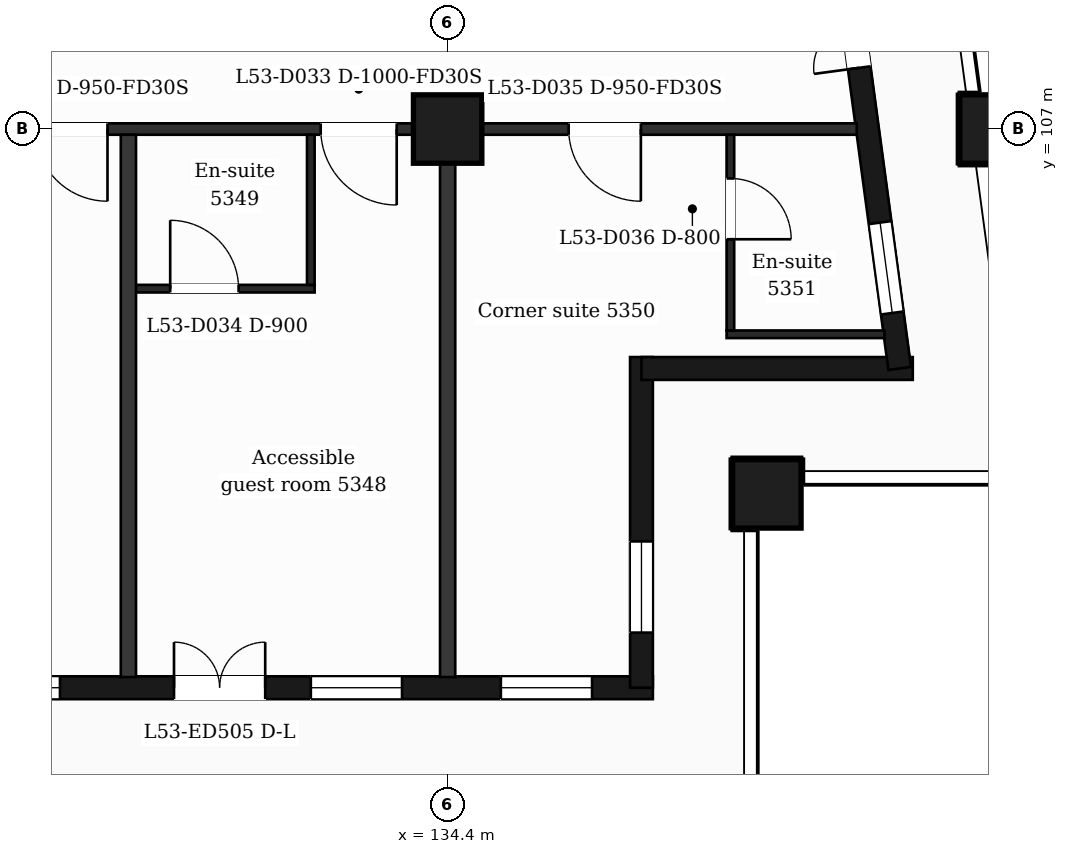
"""IFC4 building model, lengths in metres.
Left out: names, types, materials, properties, quantities, classifications, styles, units other than length and angle.
Written with IfcOpenShell. Run it as: python <this file> out.ifc"""

import sys

from ifc_helpers import new_model, si_unit, direction, frame, frame_2d, origin, origin_2d, place, context, subcontext, project, spatial, rectangle, extrude, element, fill, save


model = new_model("IFC4")
c1 = context("Model", 3, precision=1e-05, world=origin(), true_north=direction((0.0, 1.0)))
c2 = subcontext(c1, "Body", "Model", "MODEL_VIEW")
j1 = project(units=[si_unit("LENGTHUNIT", "METRE"), si_unit("PLANEANGLEUNIT", "RADIAN")], contexts=[c1])
p1 = place(None, origin())
s1 = spatial("IfcSite", under=j1, at=p1, CompositionType="ELEMENT")
p2 = place(p1, origin())
s2 = spatial("IfcBuilding", under=s1, at=p2, CompositionType="ELEMENT")
p3 = place(p2, frame((0.0, 0.0, 220.7)))
s3 = spatial("IfcBuildingStorey", under=s2, at=p3, CompositionType="ELEMENT", Elevation=220.7)
for number, where, z_axis, x_axis in (
    (1, (138.6, 102.2, 0.0), (0.0, 0.0, 1.0), (1.0, 0.0, 0.0)),
    (2, (134.4, 107.0, 0.0), (0.0, 0.0, 1.0), (1.0, 0.0, 0.0)),
    (3, (141.588, 107.0, 0.0), (0.0, 0.0, 1.0), (1.0, 0.0, 0.0)),
):
    element("IfcColumn", number, at=place(p3, frame(where, z_axis=z_axis, x_axis=x_axis)), inside=s3, PredefinedType="COLUMN", context=c2, shape_type="SweptSolid", body=[
        extrude(rectangle(XDim=0.9, YDim=0.9, at=origin_2d()), origin(), (0.0, 0.0, 1.0), 3.7),
    ])
p4 = place(p3, frame((89.85, 99.65, 0.0), z_axis=(0.0, 0.0, 1.0), x_axis=(1.0, 0.0, 0.0)))
e4 = element("IfcWall", 4, at=p4, inside=s3, PredefinedType="SOLIDWALL", context=c2, shape_type="SweptSolid", body=[
    extrude(rectangle(XDim=47.25, YDim=0.3, at=frame_2d((23.625, 0.0))), origin(), (0.0, 0.0, 1.0), 3.38),
])
p5 = place(p4, frame((0.725, 0.0, 0.9)))
e5 = element("IfcOpeningElement", 5, at=p5, cuts=e4, PredefinedType="OPENING", context=c2, shape_type="SweptSolid", body=[
    extrude(rectangle(XDim=1.2, YDim=2.1, at=frame_2d((0.6, 1.05))), frame((0.0, 0.16, 0.0), z_axis=(0.0, -1.0, 0.0), x_axis=(1.0, 0.0, 0.0)), (0.0, 0.0, 1.0), 0.32),
])
p6 = place(p4, frame((3.45, 0.0, 0.9)))
e6 = element("IfcOpeningElement", 6, at=p6, cuts=e4, PredefinedType="OPENING", context=c2, shape_type="SweptSolid", body=[
    extrude(rectangle(XDim=2.4, YDim=2.1, at=frame_2d((1.2, 1.05))), frame((0.0, 0.16, 0.0), z_axis=(0.0, -1.0, 0.0), x_axis=(1.0, 0.0, 0.0)), (0.0, 0.0, 1.0), 0.32),
])
p7 = place(p4, frame((7.65, 0.0, 0.9)))
e7 = element("IfcOpeningElement", 7, at=p7, cuts=e4, PredefinedType="OPENING", context=c2, shape_type="SweptSolid", body=[
    extrude(rectangle(XDim=2.4, YDim=2.1, at=frame_2d((1.2, 1.05))), frame((0.0, 0.16, 0.0), z_axis=(0.0, -1.0, 0.0), x_axis=(1.0, 0.0, 0.0)), (0.0, 0.0, 1.0), 0.32),
])
p8 = place(p4, frame((11.85, 0.0, 0.9)))
e8 = element("IfcOpeningElement", 8, at=p8, cuts=e4, PredefinedType="OPENING", context=c2, shape_type="SweptSolid", body=[
    extrude(rectangle(XDim=2.4, YDim=2.1, at=frame_2d((1.2, 1.05))), frame((0.0, 0.16, 0.0), z_axis=(0.0, -1.0, 0.0), x_axis=(1.0, 0.0, 0.0)), (0.0, 0.0, 1.0), 0.32),
])
p9 = place(p4, frame((16.05, 0.0, 0.9)))
e9 = element("IfcOpeningElement", 9, at=p9, cuts=e4, PredefinedType="OPENING", context=c2, shape_type="SweptSolid", body=[
    extrude(rectangle(XDim=2.4, YDim=2.1, at=frame_2d((1.2, 1.05))), frame((0.0, 0.16, 0.0), z_axis=(0.0, -1.0, 0.0), x_axis=(1.0, 0.0, 0.0)), (0.0, 0.0, 1.0), 0.32),
])
p10 = place(p4, frame((20.25, 0.0, 0.9)))
e10 = element("IfcOpeningElement", 10, at=p10, cuts=e4, PredefinedType="OPENING", context=c2, shape_type="SweptSolid", body=[
    extrude(rectangle(XDim=2.4, YDim=2.1, at=frame_2d((1.2, 1.05))), frame((0.0, 0.16, 0.0), z_axis=(0.0, -1.0, 0.0), x_axis=(1.0, 0.0, 0.0)), (0.0, 0.0, 1.0), 0.32),
])
p11 = place(p4, frame((25.05, 0.0, 0.9)))
e11 = element("IfcOpeningElement", 11, at=p11, cuts=e4, PredefinedType="OPENING", context=c2, shape_type="SweptSolid", body=[
    extrude(rectangle(XDim=1.2, YDim=2.1, at=frame_2d((0.6, 1.05))), frame((0.0, 0.16, 0.0), z_axis=(0.0, -1.0, 0.0), x_axis=(1.0, 0.0, 0.0)), (0.0, 0.0, 1.0), 0.32),
])
p12 = place(p4, frame((29.25, 0.0, 0.9)))
e12 = element("IfcOpeningElement", 12, at=p12, cuts=e4, PredefinedType="OPENING", context=c2, shape_type="SweptSolid", body=[
    extrude(rectangle(XDim=1.2, YDim=2.1, at=frame_2d((0.6, 1.05))), frame((0.0, 0.16, 0.0), z_axis=(0.0, -1.0, 0.0), x_axis=(1.0, 0.0, 0.0)), (0.0, 0.0, 1.0), 0.32),
])
p13 = place(p4, frame((32.55, 0.0, 0.0)))
e13 = element("IfcOpeningElement", 13, at=p13, cuts=e4, PredefinedType="OPENING", context=c2, shape_type="SweptSolid", body=[
    extrude(rectangle(XDim=1.2, YDim=2.4, at=frame_2d((0.6, 1.2))), frame((0.0, 0.16, 0.0), z_axis=(0.0, -1.0, 0.0), x_axis=(1.0, 0.0, 0.0)), (0.0, 0.0, 1.0), 0.32),
])
p14 = place(p4, frame((34.35, 0.0, 0.9)))
e14 = element("IfcOpeningElement", 14, at=p14, cuts=e4, PredefinedType="OPENING", context=c2, shape_type="SweptSolid", body=[
    extrude(rectangle(XDim=1.2, YDim=2.1, at=frame_2d((0.6, 1.05))), frame((0.0, 0.16, 0.0), z_axis=(0.0, -1.0, 0.0), x_axis=(1.0, 0.0, 0.0)), (0.0, 0.0, 1.0), 0.32),
])
p15 = place(p4, frame((37.05, 0.0, 0.9)))
e15 = element("IfcOpeningElement", 15, at=p15, cuts=e4, PredefinedType="OPENING", context=c2, shape_type="SweptSolid", body=[
    extrude(rectangle(XDim=2.4, YDim=2.1, at=frame_2d((1.2, 1.05))), frame((0.0, 0.16, 0.0), z_axis=(0.0, -1.0, 0.0), x_axis=(1.0, 0.0, 0.0)), (0.0, 0.0, 1.0), 0.32),
])
p16 = place(p4, frame((40.95, 0.0, 0.0)))
e16 = element("IfcOpeningElement", 16, at=p16, cuts=e4, PredefinedType="OPENING", context=c2, shape_type="SweptSolid", body=[
    extrude(rectangle(XDim=1.2, YDim=2.4, at=frame_2d((0.6, 1.2))), frame((0.0, 0.16, 0.0), z_axis=(0.0, -1.0, 0.0), x_axis=(1.0, 0.0, 0.0)), (0.0, 0.0, 1.0), 0.32),
])
p17 = place(p4, frame((42.75, 0.0, 0.9)))
e17 = element("IfcOpeningElement", 17, at=p17, cuts=e4, PredefinedType="OPENING", context=c2, shape_type="SweptSolid", body=[
    extrude(rectangle(XDim=1.2, YDim=2.1, at=frame_2d((0.6, 1.05))), frame((0.0, 0.16, 0.0), z_axis=(0.0, -1.0, 0.0), x_axis=(1.0, 0.0, 0.0)), (0.0, 0.0, 1.0), 0.32),
])
p18 = place(p4, frame((45.25, 0.0, 0.9)))
e18 = element("IfcOpeningElement", 18, at=p18, cuts=e4, PredefinedType="OPENING", context=c2, shape_type="SweptSolid", body=[
    extrude(rectangle(XDim=1.2, YDim=2.1, at=frame_2d((0.6, 1.05))), frame((0.0, 0.16, 0.0), z_axis=(0.0, -1.0, 0.0), x_axis=(1.0, 0.0, 0.0)), (0.0, 0.0, 1.0), 0.32),
])
p19 = place(p3, frame((136.95, 99.65, 0.0), z_axis=(0.0, 0.0, 1.0), x_axis=(0.0, 1.0, 0.0)))
e19 = element("IfcWall", 19, at=p19, inside=s3, PredefinedType="SOLIDWALL", context=c2, shape_type="SweptSolid", body=[
    extrude(rectangle(XDim=4.35, YDim=0.3, at=frame_2d((2.175, 0.0))), origin(), (0.0, 0.0, 1.0), 3.38),
])
p20 = place(p19, frame((0.725, 0.0, 0.9)))
e20 = element("IfcOpeningElement", 20, at=p20, cuts=e19, PredefinedType="OPENING", context=c2, shape_type="SweptSolid", body=[
    extrude(rectangle(XDim=1.2, YDim=2.1, at=frame_2d((0.6, 1.05))), frame((0.0, 0.16, 0.0), z_axis=(0.0, -1.0, 0.0), x_axis=(1.0, 0.0, 0.0)), (0.0, 0.0, 1.0), 0.32),
])
p21 = place(p3, frame((136.95, 103.85, 0.0), z_axis=(0.0, 0.0, 1.0), x_axis=(1.0, 0.0, 0.0)))
e21 = element("IfcWall", 21, at=p21, inside=s3, PredefinedType="SOLIDWALL", context=c2, shape_type="SweptSolid", body=[
    extrude(rectangle(XDim=3.569, YDim=0.3, at=frame_2d((1.785, 0.0))), origin(), (0.0, 0.0, 1.0), 3.38),
])
p22 = place(p3, frame((140.348, 103.85, 0.0), z_axis=(0.0, 0.0, 1.0), x_axis=(-0.133431549479, 0.991058031401, 0.0)))
e22 = element("IfcWall", 22, at=p22, inside=s3, PredefinedType="SOLIDWALL", context=c2, shape_type="SweptSolid", body=[
    extrude(rectangle(XDim=6.609, YDim=0.3, at=frame_2d((3.304, 0.0))), origin(), (0.0, 0.0, 1.0), 3.38),
])
p23 = place(p22, frame((0.737, 0.0, 0.9)))
e23 = element("IfcOpeningElement", 23, at=p23, cuts=e22, PredefinedType="OPENING", context=c2, shape_type="SweptSolid", body=[
    extrude(rectangle(XDim=1.2, YDim=2.1, at=frame_2d((0.6, 1.05))), frame((0.0, 0.16, 0.0), z_axis=(0.0, -1.0, 0.0), x_axis=(1.0, 0.0, 0.0)), (0.0, 0.0, 1.0), 0.32),
])
p24 = place(p22, frame((3.991, 0.0, 0.0)))
e24 = element("IfcOpeningElement", 24, at=p24, cuts=e22, PredefinedType="OPENING", context=c2, shape_type="SweptSolid", body=[
    extrude(rectangle(XDim=1.2, YDim=2.4, at=frame_2d((0.6, 1.2))), frame((0.0, 0.16, 0.0), z_axis=(0.0, -1.0, 0.0), x_axis=(1.0, 0.0, 0.0)), (0.0, 0.0, 1.0), 0.32),
])
p25 = place(p3, frame((138.07, 104.3, 0.0), z_axis=(0.0, 0.0, 1.0), x_axis=(1.0, 0.0, 0.0)))
e25 = element("IfcWall", 25, at=p25, inside=s3, PredefinedType="PARTITIONING", context=c2, shape_type="SweptSolid", body=[
    extrude(rectangle(XDim=2.076, YDim=0.1, at=frame_2d((1.038, 0.0))), origin(), (0.0, 0.0, 1.0), 3.38),
])
p26 = place(p3, frame((130.2, 104.9, 0.0), z_axis=(0.0, 0.0, 1.0), x_axis=(1.0, 0.0, 0.0)))
e26 = element("IfcWall", 26, at=p26, inside=s3, PredefinedType="PARTITIONING", context=c2, shape_type="SweptSolid", body=[
    extrude(rectangle(XDim=2.45, YDim=0.1, at=frame_2d((1.225, 0.0))), origin(), (0.0, 0.0, 1.0), 3.38),
])
p27 = place(p26, frame((0.55, 0.0, 0.0)))
e27 = element("IfcOpeningElement", 27, at=p27, cuts=e26, PredefinedType="OPENING", context=c2, shape_type="SweptSolid", body=[
    extrude(rectangle(XDim=0.9, YDim=2.1, at=frame_2d((0.45, 1.05))), frame((0.0, 0.06, 0.0), z_axis=(0.0, -1.0, 0.0), x_axis=(1.0, 0.0, 0.0)), (0.0, 0.0, 1.0), 0.12),
])
p28 = place(p3, frame((87.018, 107.0, 0.0), z_axis=(0.0, 0.0, 1.0), x_axis=(1.0, 0.0, 0.0)))
e28 = element("IfcWall", 28, at=p28, inside=s3, PredefinedType="PARTITIONING", context=c2, shape_type="SweptSolid", body=[
    extrude(rectangle(XDim=52.765, YDim=0.15, at=frame_2d((26.382, 0.0))), origin(), (0.0, 0.0, 1.0), 3.38),
])
p29 = place(p28, frame((0.707, 0.0, 0.0)))
e29 = element("IfcOpeningElement", 29, at=p29, cuts=e28, PredefinedType="OPENING", context=c2, shape_type="SweptSolid", body=[
    extrude(rectangle(XDim=0.95, YDim=2.1, at=frame_2d((0.475, 1.05))), frame((0.0, 0.085, 0.0), z_axis=(0.0, -1.0, 0.0), x_axis=(1.0, 0.0, 0.0)), (0.0, 0.0, 1.0), 0.17),
])
p30 = place(p28, frame((6.894, 0.0, 0.0)))
e30 = element("IfcOpeningElement", 30, at=p30, cuts=e28, PredefinedType="OPENING", context=c2, shape_type="SweptSolid", body=[
    extrude(rectangle(XDim=0.95, YDim=2.1, at=frame_2d((0.475, 1.05))), frame((0.0, 0.085, 0.0), z_axis=(0.0, -1.0, 0.0), x_axis=(1.0, 0.0, 0.0)), (0.0, 0.0, 1.0), 0.17),
])
p31 = place(p28, frame((15.662, 0.0, 0.0)))
e31 = element("IfcOpeningElement", 31, at=p31, cuts=e28, PredefinedType="OPENING", context=c2, shape_type="SweptSolid", body=[
    extrude(rectangle(XDim=0.95, YDim=2.1, at=frame_2d((0.475, 1.05))), frame((0.0, 0.085, 0.0), z_axis=(0.0, -1.0, 0.0), x_axis=(1.0, 0.0, 0.0)), (0.0, 0.0, 1.0), 0.17),
])
p32 = place(p28, frame((18.257, 0.0, 0.0)))
e32 = element("IfcOpeningElement", 32, at=p32, cuts=e28, PredefinedType="OPENING", context=c2, shape_type="SweptSolid", body=[
    extrude(rectangle(XDim=0.95, YDim=2.1, at=frame_2d((0.475, 1.05))), frame((0.0, 0.085, 0.0), z_axis=(0.0, -1.0, 0.0), x_axis=(1.0, 0.0, 0.0)), (0.0, 0.0, 1.0), 0.17),
])
p33 = place(p28, frame((28.607, 0.0, 0.0)))
e33 = element("IfcOpeningElement", 33, at=p33, cuts=e28, PredefinedType="OPENING", context=c2, shape_type="SweptSolid", body=[
    extrude(rectangle(XDim=1.0, YDim=2.1, at=frame_2d((0.5, 1.05))), frame((0.0, 0.085, 0.0), z_axis=(0.0, -1.0, 0.0), x_axis=(1.0, 0.0, 0.0)), (0.0, 0.0, 1.0), 0.17),
])
p34 = place(p28, frame((31.302, 0.0, 0.0)))
e34 = element("IfcOpeningElement", 34, at=p34, cuts=e28, PredefinedType="OPENING", context=c2, shape_type="SweptSolid", body=[
    extrude(rectangle(XDim=0.95, YDim=2.1, at=frame_2d((0.475, 1.05))), frame((0.0, 0.085, 0.0), z_axis=(0.0, -1.0, 0.0), x_axis=(1.0, 0.0, 0.0)), (0.0, 0.0, 1.0), 0.17),
])
p35 = place(p28, frame((35.057, 0.0, 0.0)))
e35 = element("IfcOpeningElement", 35, at=p35, cuts=e28, PredefinedType="OPENING", context=c2, shape_type="SweptSolid", body=[
    extrude(rectangle(XDim=0.95, YDim=2.1, at=frame_2d((0.475, 1.05))), frame((0.0, 0.085, 0.0), z_axis=(0.0, -1.0, 0.0), x_axis=(1.0, 0.0, 0.0)), (0.0, 0.0, 1.0), 0.17),
])
p36 = place(p28, frame((41.957, 0.0, 0.0)))
e36 = element("IfcOpeningElement", 36, at=p36, cuts=e28, PredefinedType="OPENING", context=c2, shape_type="SweptSolid", body=[
    extrude(rectangle(XDim=0.95, YDim=2.1, at=frame_2d((0.475, 1.05))), frame((0.0, 0.085, 0.0), z_axis=(0.0, -1.0, 0.0), x_axis=(1.0, 0.0, 0.0)), (0.0, 0.0, 1.0), 0.17),
])
p37 = place(p28, frame((45.712, 0.0, 0.0)))
e37 = element("IfcOpeningElement", 37, at=p37, cuts=e28, PredefinedType="OPENING", context=c2, shape_type="SweptSolid", body=[
    extrude(rectangle(XDim=1.0, YDim=2.1, at=frame_2d((0.5, 1.05))), frame((0.0, 0.085, 0.0), z_axis=(0.0, -1.0, 0.0), x_axis=(1.0, 0.0, 0.0)), (0.0, 0.0, 1.0), 0.17),
])
p38 = place(p28, frame((48.974, 0.0, 0.0)))
e38 = element("IfcOpeningElement", 38, at=p38, cuts=e28, PredefinedType="OPENING", context=c2, shape_type="SweptSolid", body=[
    extrude(rectangle(XDim=0.95, YDim=2.1, at=frame_2d((0.475, 1.05))), frame((0.0, 0.085, 0.0), z_axis=(0.0, -1.0, 0.0), x_axis=(1.0, 0.0, 0.0)), (0.0, 0.0, 1.0), 0.17),
])
p39 = place(p3, frame((130.2, 99.79, 0.0), z_axis=(0.0, 0.0, 1.0), x_axis=(0.0, 1.0, 0.0)))
e39 = element("IfcWall", 39, at=p39, inside=s3, PredefinedType="PARTITIONING", context=c2, shape_type="SweptSolid", body=[
    extrude(rectangle(XDim=7.135, YDim=0.2, at=frame_2d((3.567, 0.0))), origin(), (0.0, 0.0, 1.0), 3.38),
])
p40 = place(p3, frame((132.6, 104.95, 0.0), z_axis=(0.0, 0.0, 1.0), x_axis=(0.0, 1.0, 0.0)))
e40 = element("IfcWall", 40, at=p40, inside=s3, PredefinedType="PARTITIONING", context=c2, shape_type="SweptSolid", body=[
    extrude(rectangle(XDim=1.975, YDim=0.1, at=frame_2d((0.988, 0.0))), origin(), (0.0, 0.0, 1.0), 3.38),
])
p41 = place(p3, frame((134.4, 99.79, 0.0), z_axis=(0.0, 0.0, 1.0), x_axis=(0.0, 1.0, 0.0)))
e41 = element("IfcWall", 41, at=p41, inside=s3, PredefinedType="PARTITIONING", context=c2, shape_type="SweptSolid", body=[
    extrude(rectangle(XDim=7.135, YDim=0.2, at=frame_2d((3.567, 0.0))), origin(), (0.0, 0.0, 1.0), 3.38),
])
p42 = place(p3, frame((138.12, 104.35, 0.0), z_axis=(0.0, 0.0, 1.0), x_axis=(0.0, 1.0, 0.0)))
e42 = element("IfcWall", 42, at=p42, inside=s3, PredefinedType="PARTITIONING", context=c2, shape_type="SweptSolid", body=[
    extrude(rectangle(XDim=2.575, YDim=0.1, at=frame_2d((1.288, 0.0))), origin(), (0.0, 0.0, 1.0), 3.38),
])
p43 = place(p42, frame((1.2, 0.0, 0.0)))
e43 = element("IfcOpeningElement", 43, at=p43, cuts=e42, PredefinedType="OPENING", context=c2, shape_type="SweptSolid", body=[
    extrude(rectangle(XDim=0.8, YDim=2.1, at=frame_2d((0.4, 1.05))), frame((0.0, 0.06, 0.0), z_axis=(0.0, -1.0, 0.0), x_axis=(1.0, 0.0, 0.0)), (0.0, 0.0, 1.0), 0.12),
])
p44 = place(p15, origin())
e44 = element("IfcWindow", 44, at=p44, inside=s3, PartitioningType="SINGLE_PANEL", PredefinedType="WINDOW", context=c2, shape_type="SweptSolid", body=[
    extrude(rectangle(XDim=2.4, YDim=2.1, at=frame_2d((1.2, 1.05))), frame((0.0, 0.03, 0.0), z_axis=(0.0, -1.0, 0.0), x_axis=(1.0, 0.0, 0.0)), (0.0, 0.0, 1.0), 0.06),
])
fill(e15, e44)
p45 = place(p16, origin())
e45 = element("IfcDoor", 45, at=p45, inside=s3, OperationType="DOUBLE_DOOR_SINGLE_SWING", PredefinedType="DOOR", context=c2, shape_type="SweptSolid", body=[
    extrude(rectangle(XDim=1.2, YDim=2.4, at=frame_2d((0.6, 1.2))), frame((0.0, 0.025, 0.0), z_axis=(0.0, -1.0, 0.0), x_axis=(1.0, 0.0, 0.0)), (0.0, 0.0, 1.0), 0.05),
])
fill(e16, e45)
p46 = place(p17, origin())
e46 = element("IfcWindow", 46, at=p46, inside=s3, PartitioningType="SINGLE_PANEL", PredefinedType="WINDOW", context=c2, shape_type="SweptSolid", body=[
    extrude(rectangle(XDim=1.2, YDim=2.1, at=frame_2d((0.6, 1.05))), frame((0.0, 0.03, 0.0), z_axis=(0.0, -1.0, 0.0), x_axis=(1.0, 0.0, 0.0)), (0.0, 0.0, 1.0), 0.06),
])
fill(e17, e46)
p47 = place(p18, origin())
e47 = element("IfcWindow", 47, at=p47, inside=s3, PartitioningType="SINGLE_PANEL", PredefinedType="WINDOW", context=c2, shape_type="SweptSolid", body=[
    extrude(rectangle(XDim=1.2, YDim=2.1, at=frame_2d((0.6, 1.05))), frame((0.0, 0.03, 0.0), z_axis=(0.0, -1.0, 0.0), x_axis=(1.0, 0.0, 0.0)), (0.0, 0.0, 1.0), 0.06),
])
fill(e18, e47)
p48 = place(p20, origin())
e48 = element("IfcWindow", 48, at=p48, inside=s3, PartitioningType="SINGLE_PANEL", PredefinedType="WINDOW", context=c2, shape_type="SweptSolid", body=[
    extrude(rectangle(XDim=1.2, YDim=2.1, at=frame_2d((0.6, 1.05))), frame((0.0, 0.03, 0.0), z_axis=(0.0, -1.0, 0.0), x_axis=(1.0, 0.0, 0.0)), (0.0, 0.0, 1.0), 0.06),
])
fill(e20, e48)
p49 = place(p23, origin())
e49 = element("IfcWindow", 49, at=p49, inside=s3, PartitioningType="SINGLE_PANEL", PredefinedType="WINDOW", context=c2, shape_type="SweptSolid", body=[
    extrude(rectangle(XDim=1.2, YDim=2.1, at=frame_2d((0.6, 1.05))), frame((0.0, 0.03, 0.0), z_axis=(0.0, -1.0, 0.0), x_axis=(1.0, 0.0, 0.0)), (0.0, 0.0, 1.0), 0.06),
])
fill(e23, e49)
p50 = place(p24, origin())
e50 = element("IfcDoor", 50, at=p50, inside=s3, OperationType="DOUBLE_DOOR_SINGLE_SWING", PredefinedType="DOOR", context=c2, shape_type="SweptSolid", body=[
    extrude(rectangle(XDim=1.2, YDim=2.4, at=frame_2d((0.6, 1.2))), frame((0.0, 0.025, 0.0), z_axis=(0.0, -1.0, 0.0), x_axis=(1.0, 0.0, 0.0)), (0.0, 0.0, 1.0), 0.05),
])
fill(e24, e50)
p51 = place(p36, origin())
e51 = element("IfcDoor", 51, at=p51, inside=s3, OperationType="SINGLE_SWING_RIGHT", PredefinedType="DOOR", context=c2, shape_type="SweptSolid", body=[
    extrude(rectangle(XDim=0.95, YDim=2.1, at=frame_2d((0.475, 1.05))), frame((0.0, 0.025, 0.0), z_axis=(0.0, -1.0, 0.0), x_axis=(1.0, 0.0, 0.0)), (0.0, 0.0, 1.0), 0.05),
])
fill(e36, e51)
p52 = place(p37, origin())
e52 = element("IfcDoor", 52, at=p52, inside=s3, OperationType="SINGLE_SWING_RIGHT", PredefinedType="DOOR", context=c2, shape_type="SweptSolid", body=[
    extrude(rectangle(XDim=1.0, YDim=2.1, at=frame_2d((0.5, 1.05))), frame((0.0, 0.025, 0.0), z_axis=(0.0, -1.0, 0.0), x_axis=(1.0, 0.0, 0.0)), (0.0, 0.0, 1.0), 0.05),
])
fill(e37, e52)
p53 = place(p27, origin())
e53 = element("IfcDoor", 53, at=p53, inside=s3, OperationType="SINGLE_SWING_LEFT", PredefinedType="DOOR", context=c2, shape_type="SweptSolid", body=[
    extrude(rectangle(XDim=0.9, YDim=2.1, at=frame_2d((0.45, 1.05))), frame((0.0, 0.025, 0.0), z_axis=(0.0, -1.0, 0.0), x_axis=(1.0, 0.0, 0.0)), (0.0, 0.0, 1.0), 0.05),
])
fill(e27, e53)
p54 = place(p38, origin())
e54 = element("IfcDoor", 54, at=p54, inside=s3, OperationType="SINGLE_SWING_RIGHT", PredefinedType="DOOR", context=c2, shape_type="SweptSolid", body=[
    extrude(rectangle(XDim=0.95, YDim=2.1, at=frame_2d((0.475, 1.05))), frame((0.0, 0.025, 0.0), z_axis=(0.0, -1.0, 0.0), x_axis=(1.0, 0.0, 0.0)), (0.0, 0.0, 1.0), 0.05),
])
fill(e38, e54)
p55 = place(p43, origin())
e55 = element("IfcDoor", 55, at=p55, inside=s3, OperationType="SINGLE_SWING_LEFT", PredefinedType="DOOR", context=c2, shape_type="SweptSolid", body=[
    extrude(rectangle(XDim=0.8, YDim=2.1, at=frame_2d((0.4, 1.05))), frame((0.0, 0.025, 0.0), z_axis=(0.0, -1.0, 0.0), x_axis=(1.0, 0.0, 0.0)), (0.0, 0.0, 1.0), 0.05),
])
fill(e43, e55)
save(model, sys.argv[1])
